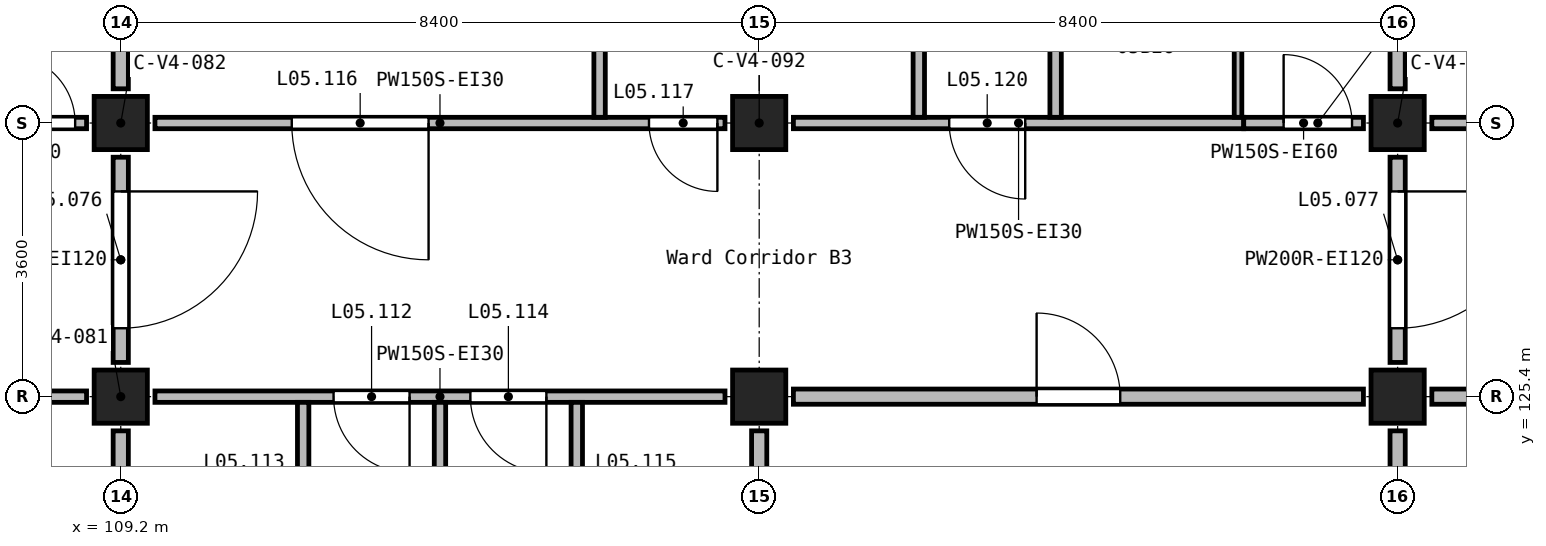
"""IFC4 building model, lengths in metres.
Left out: names, types, materials, properties, quantities, classifications, styles, units other than length and angle.
Written with IfcOpenShell. Run it as: python <this file> out.ifc"""

import sys

from ifc_helpers import new_model, si_unit, direction, frame, frame_2d, origin, origin_2d, place, context, subcontext, project, spatial, rectangle, extrude, element, fill, save


model = new_model("IFC4")
c1 = context("Model", 3, precision=1e-05, world=origin(), true_north=direction((0.0, 1.0)))
c2 = subcontext(c1, "Body", "Model", "MODEL_VIEW")
j1 = project(units=[si_unit("LENGTHUNIT", "METRE"), si_unit("PLANEANGLEUNIT", "RADIAN")], contexts=[c1])
p1 = place(None, origin())
s1 = spatial("IfcSite", under=j1, at=p1, CompositionType="ELEMENT")
p2 = place(p1, origin())
s2 = spatial("IfcBuilding", under=s1, at=p2, CompositionType="ELEMENT")
p3 = place(p2, frame((0.0, 0.0, 24.9)))
s3 = spatial("IfcBuildingStorey", under=s2, at=p3, CompositionType="ELEMENT", Elevation=24.9)
for number, where, z_axis, x_axis in (
    (1, (109.2, 125.4, 0.0), (0.0, 0.0, 1.0), (1.0, 0.0, 0.0)),
    (2, (109.2, 129.0, 0.0), (0.0, 0.0, 1.0), (1.0, 0.0, 0.0)),
    (3, (117.6, 125.4, 0.0), (0.0, 0.0, 1.0), (1.0, 0.0, 0.0)),
    (4, (117.6, 129.0, 0.0), (0.0, 0.0, 1.0), (1.0, 0.0, 0.0)),
    (5, (126.0, 125.4, 0.0), (0.0, 0.0, 1.0), (1.0, 0.0, 0.0)),
    (6, (126.0, 129.0, 0.0), (0.0, 0.0, 1.0), (1.0, 0.0, 0.0)),
):
    element("IfcColumn", number, at=place(p3, frame(where, z_axis=z_axis, x_axis=x_axis)), inside=s3, PredefinedType="COLUMN", context=c2, shape_type="SweptSolid", body=[
        extrude(rectangle(XDim=0.7, YDim=0.7, at=origin_2d()), origin(), (0.0, 0.0, 1.0), 3.9),
    ])
p4 = place(p3, frame((109.2, 136.35, 0.0), z_axis=(0.0, 0.0, 1.0), x_axis=(0.0, -1.0, 0.0)))
e7 = element("IfcWall", 7, at=p4, inside=s3, PredefinedType="SOLIDWALL", context=c2, shape_type="SweptSolid", body=[
    extrude(rectangle(XDim=6.9, YDim=0.2, at=frame_2d((3.45, 0.0))), origin(), (0.0, 0.0, 1.0), 3.6),
])
p5 = place(p3, frame((109.2, 128.55, 0.0), z_axis=(0.0, 0.0, 1.0), x_axis=(0.0, -1.0, 0.0)))
e8 = element("IfcWall", 8, at=p5, inside=s3, PredefinedType="SOLIDWALL", context=c2, shape_type="SweptSolid", body=[
    extrude(rectangle(XDim=2.7, YDim=0.2, at=frame_2d((1.35, 0.0))), origin(), (0.0, 0.0, 1.0), 3.6),
])
p6 = place(p5, frame((0.45, 0.0, 0.0)))
e9 = element("IfcOpeningElement", 9, at=p6, cuts=e8, PredefinedType="OPENING", context=c2, shape_type="SweptSolid", body=[
    extrude(rectangle(XDim=1.8, YDim=2.1, at=frame_2d((0.9, 1.05))), frame((0.0, 0.11, 0.0), z_axis=(0.0, -1.0, 0.0), x_axis=(1.0, 0.0, 0.0)), (0.0, 0.0, 1.0), 0.22),
])
p7 = place(p3, frame((109.2, 124.95, 0.0), z_axis=(0.0, 0.0, 1.0), x_axis=(0.0, -1.0, 0.0)))
e10 = element("IfcWall", 10, at=p7, inside=s3, PredefinedType="SOLIDWALL", context=c2, shape_type="SweptSolid", body=[
    extrude(rectangle(XDim=6.9, YDim=0.2, at=frame_2d((3.45, 0.0))), origin(), (0.0, 0.0, 1.0), 3.6),
])
p8 = place(p3, frame((126.0, 136.35, 0.0), z_axis=(0.0, 0.0, 1.0), x_axis=(0.0, -1.0, 0.0)))
e11 = element("IfcWall", 11, at=p8, inside=s3, PredefinedType="SOLIDWALL", context=c2, shape_type="SweptSolid", body=[
    extrude(rectangle(XDim=6.9, YDim=0.2, at=frame_2d((3.45, 0.0))), origin(), (0.0, 0.0, 1.0), 3.6),
])
p9 = place(p3, frame((126.0, 128.55, 0.0), z_axis=(0.0, 0.0, 1.0), x_axis=(0.0, -1.0, 0.0)))
e12 = element("IfcWall", 12, at=p9, inside=s3, PredefinedType="SOLIDWALL", context=c2, shape_type="SweptSolid", body=[
    extrude(rectangle(XDim=2.7, YDim=0.2, at=frame_2d((1.35, 0.0))), origin(), (0.0, 0.0, 1.0), 3.6),
])
p10 = place(p9, frame((0.45, 0.0, 0.0)))
e13 = element("IfcOpeningElement", 13, at=p10, cuts=e12, PredefinedType="OPENING", context=c2, shape_type="SweptSolid", body=[
    extrude(rectangle(XDim=1.8, YDim=2.1, at=frame_2d((0.9, 1.05))), frame((0.0, 0.11, 0.0), z_axis=(0.0, -1.0, 0.0), x_axis=(1.0, 0.0, 0.0)), (0.0, 0.0, 1.0), 0.22),
])
p11 = place(p3, frame((126.0, 124.95, 0.0), z_axis=(0.0, 0.0, 1.0), x_axis=(0.0, -1.0, 0.0)))
e14 = element("IfcWall", 14, at=p11, inside=s3, PredefinedType="SOLIDWALL", context=c2, shape_type="SweptSolid", body=[
    extrude(rectangle(XDim=1.775, YDim=0.2, at=frame_2d((0.887, 0.0))), origin(), (0.0, 0.0, 1.0), 3.6),
])
p12 = place(p3, frame((118.05, 125.4, 0.0), z_axis=(0.0, 0.0, 1.0), x_axis=(1.0, 0.0, 0.0)))
e15 = element("IfcWall", 15, at=p12, inside=s3, PredefinedType="SOLIDWALL", context=c2, shape_type="SweptSolid", body=[
    extrude(rectangle(XDim=7.5, YDim=0.2, at=frame_2d((3.75, 0.0))), origin(), (0.0, 0.0, 1.0), 3.6),
])
p13 = place(p12, frame((3.2, 0.0, 0.0)))
e16 = element("IfcOpeningElement", 16, at=p13, cuts=e15, PredefinedType="OPENING", context=c2, shape_type="SweptSolid", body=[
    extrude(rectangle(XDim=1.1, YDim=2.1, at=frame_2d((0.55, 1.05))), frame((0.0, 0.11, 0.0), z_axis=(0.0, -1.0, 0.0), x_axis=(1.0, 0.0, 0.0)), (0.0, 0.0, 1.0), 0.22),
])
p14 = place(p3, frame((126.45, 125.4, 0.0), z_axis=(0.0, 0.0, 1.0), x_axis=(1.0, 0.0, 0.0)))
e17 = element("IfcWall", 17, at=p14, inside=s3, PredefinedType="SOLIDWALL", context=c2, shape_type="SweptSolid", body=[
    extrude(rectangle(XDim=3.85, YDim=0.2, at=frame_2d((1.925, 0.0))), origin(), (0.0, 0.0, 1.0), 3.6),
])
p15 = place(p14, frame((1.15, 0.0, 0.0)))
e18 = element("IfcOpeningElement", 18, at=p15, cuts=e17, PredefinedType="OPENING", context=c2, shape_type="SweptSolid", body=[
    extrude(rectangle(XDim=1.0, YDim=2.1, at=frame_2d((0.5, 1.05))), frame((0.0, 0.11, 0.0), z_axis=(0.0, -1.0, 0.0), x_axis=(1.0, 0.0, 0.0)), (0.0, 0.0, 1.0), 0.22),
])
p16 = place(p3, frame((117.6, 123.175, 0.0), z_axis=(0.0, 0.0, 1.0), x_axis=(0.0, 1.0, 0.0)))
e19 = element("IfcWall", 19, at=p16, inside=s3, PredefinedType="SOLIDWALL", context=c2, shape_type="SweptSolid", body=[
    extrude(rectangle(XDim=1.775, YDim=0.2, at=frame_2d((0.887, 0.0))), origin(), (0.0, 0.0, 1.0), 3.6),
])
p17 = place(p3, frame((117.15, 125.4, 0.0), z_axis=(0.0, 0.0, 1.0), x_axis=(-1.0, 0.0, 0.0)))
e20 = element("IfcWall", 20, at=p17, inside=s3, PredefinedType="PARTITIONING", context=c2, shape_type="SweptSolid", body=[
    extrude(rectangle(XDim=7.5, YDim=0.15, at=frame_2d((3.75, 0.0))), origin(), (0.0, 0.0, 1.0), 3.6),
])
p18 = place(p17, frame((4.15, 0.0, 0.0)))
e21 = element("IfcOpeningElement", 21, at=p18, cuts=e20, PredefinedType="OPENING", context=c2, shape_type="SweptSolid", body=[
    extrude(rectangle(XDim=1.0, YDim=2.1, at=frame_2d((0.5, 1.05))), frame((0.0, 0.085, 0.0), z_axis=(0.0, -1.0, 0.0), x_axis=(1.0, 0.0, 0.0)), (0.0, 0.0, 1.0), 0.17),
])
p19 = place(p17, frame((2.35, 0.0, 0.0)))
e22 = element("IfcOpeningElement", 22, at=p19, cuts=e20, PredefinedType="OPENING", context=c2, shape_type="SweptSolid", body=[
    extrude(rectangle(XDim=1.0, YDim=2.1, at=frame_2d((0.5, 1.05))), frame((0.0, 0.085, 0.0), z_axis=(0.0, -1.0, 0.0), x_axis=(1.0, 0.0, 0.0)), (0.0, 0.0, 1.0), 0.17),
])
p20 = place(p3, frame((108.75, 125.4, 0.0), z_axis=(0.0, 0.0, 1.0), x_axis=(-1.0, 0.0, 0.0)))
e23 = element("IfcWall", 23, at=p20, inside=s3, PredefinedType="PARTITIONING", context=c2, shape_type="SweptSolid", body=[
    extrude(rectangle(XDim=7.5, YDim=0.15, at=frame_2d((3.75, 0.0))), origin(), (0.0, 0.0, 1.0), 3.6),
])
p21 = place(p20, frame((6.1, 0.0, 0.0)))
e24 = element("IfcOpeningElement", 24, at=p21, cuts=e23, PredefinedType="OPENING", context=c2, shape_type="SweptSolid", body=[
    extrude(rectangle(XDim=1.0, YDim=2.1, at=frame_2d((0.5, 1.05))), frame((0.0, 0.085, 0.0), z_axis=(0.0, -1.0, 0.0), x_axis=(1.0, 0.0, 0.0)), (0.0, 0.0, 1.0), 0.17),
])
p22 = place(p20, frame((2.35, 0.0, 0.0)))
e25 = element("IfcOpeningElement", 25, at=p22, cuts=e23, PredefinedType="OPENING", context=c2, shape_type="SweptSolid", body=[
    extrude(rectangle(XDim=1.0, YDim=2.1, at=frame_2d((0.5, 1.05))), frame((0.0, 0.085, 0.0), z_axis=(0.0, -1.0, 0.0), x_axis=(1.0, 0.0, 0.0)), (0.0, 0.0, 1.0), 0.17),
])
p23 = place(p3, frame((123.975, 129.0, 0.0), z_axis=(0.0, 0.0, 1.0), x_axis=(-1.0, 0.0, 0.0)))
e26 = element("IfcWall", 26, at=p23, inside=s3, PredefinedType="PARTITIONING", context=c2, shape_type="SweptSolid", body=[
    extrude(rectangle(XDim=5.925, YDim=0.15, at=frame_2d((2.962, 0.0))), origin(), (0.0, 0.0, 1.0), 3.6),
])
p24 = place(p23, frame((2.875, 0.0, 0.0)))
e27 = element("IfcOpeningElement", 27, at=p24, cuts=e26, PredefinedType="OPENING", context=c2, shape_type="SweptSolid", body=[
    extrude(rectangle(XDim=1.0, YDim=2.1, at=frame_2d((0.5, 1.05))), frame((0.0, 0.085, 0.0), z_axis=(0.0, -1.0, 0.0), x_axis=(1.0, 0.0, 0.0)), (0.0, 0.0, 1.0), 0.17),
])
p25 = place(p3, frame((117.15, 129.0, 0.0), z_axis=(0.0, 0.0, 1.0), x_axis=(-1.0, 0.0, 0.0)))
e28 = element("IfcWall", 28, at=p25, inside=s3, PredefinedType="PARTITIONING", context=c2, shape_type="SweptSolid", body=[
    extrude(rectangle(XDim=7.5, YDim=0.15, at=frame_2d((3.75, 0.0))), origin(), (0.0, 0.0, 1.0), 3.6),
])
p26 = place(p25, frame((3.9, 0.0, 0.0)))
e29 = element("IfcOpeningElement", 29, at=p26, cuts=e28, PredefinedType="OPENING", context=c2, shape_type="SweptSolid", body=[
    extrude(rectangle(XDim=1.8, YDim=2.1, at=frame_2d((0.9, 1.05))), frame((0.0, 0.085, 0.0), z_axis=(0.0, -1.0, 0.0), x_axis=(1.0, 0.0, 0.0)), (0.0, 0.0, 1.0), 0.17),
])
p27 = place(p25, frame((0.1, 0.0, 0.0)))
e30 = element("IfcOpeningElement", 30, at=p27, cuts=e28, PredefinedType="OPENING", context=c2, shape_type="SweptSolid", body=[
    extrude(rectangle(XDim=0.9, YDim=2.1, at=frame_2d((0.45, 1.05))), frame((0.0, 0.085, 0.0), z_axis=(0.0, -1.0, 0.0), x_axis=(1.0, 0.0, 0.0)), (0.0, 0.0, 1.0), 0.17),
])
p28 = place(p3, frame((126.45, 129.0, 0.0), z_axis=(0.0, 0.0, 1.0), x_axis=(1.0, 0.0, 0.0)))
e31 = element("IfcWall", 31, at=p28, inside=s3, PredefinedType="PARTITIONING", context=c2, shape_type="SweptSolid", body=[
    extrude(rectangle(XDim=7.5, YDim=0.15, at=frame_2d((3.75, 0.0))), origin(), (0.0, 0.0, 1.0), 3.6),
])
p29 = place(p28, frame((4.6, 0.0, 0.0)))
e32 = element("IfcOpeningElement", 32, at=p29, cuts=e31, PredefinedType="OPENING", context=c2, shape_type="SweptSolid", body=[
    extrude(rectangle(XDim=1.0, YDim=2.1, at=frame_2d((0.5, 1.05))), frame((0.0, 0.085, 0.0), z_axis=(0.0, -1.0, 0.0), x_axis=(1.0, 0.0, 0.0)), (0.0, 0.0, 1.0), 0.17),
])
p30 = place(p3, frame((107.175, 129.0, 0.0), z_axis=(0.0, 0.0, 1.0), x_axis=(1.0, 0.0, 0.0)))
e33 = element("IfcWall", 33, at=p30, inside=s3, PredefinedType="PARTITIONING", context=c2, shape_type="SweptSolid", body=[
    extrude(rectangle(XDim=1.575, YDim=0.15, at=frame_2d((0.788, 0.0))), origin(), (0.0, 0.0, 1.0), 3.6),
])
p31 = place(p30, frame((0.525, 0.0, 0.0)))
e34 = element("IfcOpeningElement", 34, at=p31, cuts=e33, PredefinedType="OPENING", context=c2, shape_type="SweptSolid", body=[
    extrude(rectangle(XDim=0.9, YDim=2.1, at=frame_2d((0.45, 1.05))), frame((0.0, 0.085, 0.0), z_axis=(0.0, -1.0, 0.0), x_axis=(1.0, 0.0, 0.0)), (0.0, 0.0, 1.0), 0.17),
])
p32 = place(p3, frame((123.975, 129.0, 0.0), z_axis=(0.0, 0.0, 1.0), x_axis=(1.0, 0.0, 0.0)))
e35 = element("IfcWall", 35, at=p32, inside=s3, PredefinedType="PARTITIONING", context=c2, shape_type="SweptSolid", body=[
    extrude(rectangle(XDim=1.575, YDim=0.15, at=frame_2d((0.788, 0.0))), origin(), (0.0, 0.0, 1.0), 3.6),
])
p33 = place(p32, frame((0.525, 0.0, 0.0)))
e36 = element("IfcOpeningElement", 36, at=p33, cuts=e35, PredefinedType="OPENING", context=c2, shape_type="SweptSolid", body=[
    extrude(rectangle(XDim=0.9, YDim=2.1, at=frame_2d((0.45, 1.05))), frame((0.0, 0.085, 0.0), z_axis=(0.0, -1.0, 0.0), x_axis=(1.0, 0.0, 0.0)), (0.0, 0.0, 1.0), 0.17),
])
p34 = place(p3, frame((113.4, 118.05, 0.0), z_axis=(0.0, 0.0, 1.0), x_axis=(0.0, 1.0, 0.0)))
e37 = element("IfcWall", 37, at=p34, inside=s3, PredefinedType="PARTITIONING", context=c2, shape_type="SweptSolid", body=[
    extrude(rectangle(XDim=7.275, YDim=0.15, at=frame_2d((3.637, 0.0))), origin(), (0.0, 0.0, 1.0), 3.6),
])
p35 = place(p3, frame((119.7, 129.075, 0.0), z_axis=(0.0, 0.0, 1.0), x_axis=(0.0, 1.0, 0.0)))
e38 = element("IfcWall", 38, at=p35, inside=s3, PredefinedType="PARTITIONING", context=c2, shape_type="SweptSolid", body=[
    extrude(rectangle(XDim=7.275, YDim=0.15, at=frame_2d((3.638, 0.0))), origin(), (0.0, 0.0, 1.0), 3.6),
])
p36 = place(p3, frame((111.6, 122.175, 0.0), z_axis=(0.0, 0.0, 1.0), x_axis=(0.0, 1.0, 0.0)))
e39 = element("IfcWall", 39, at=p36, inside=s3, PredefinedType="PARTITIONING", context=c2, shape_type="SweptSolid", body=[
    extrude(rectangle(XDim=3.15, YDim=0.15, at=frame_2d((1.575, 0.0))), origin(), (0.0, 0.0, 1.0), 3.6),
])
p37 = place(p36, frame((1.125, 0.0, 0.0)))
e40 = element("IfcOpeningElement", 40, at=p37, cuts=e39, PredefinedType="OPENING", context=c2, shape_type="SweptSolid", body=[
    extrude(rectangle(XDim=0.9, YDim=2.1, at=frame_2d((0.45, 1.05))), frame((0.0, 0.085, 0.0), z_axis=(0.0, -1.0, 0.0), x_axis=(1.0, 0.0, 0.0)), (0.0, 0.0, 1.0), 0.17),
])
p38 = place(p3, frame((115.2, 122.025, 0.0), z_axis=(0.0, 0.0, 1.0), x_axis=(0.0, 1.0, 0.0)))
e41 = element("IfcWall", 41, at=p38, inside=s3, PredefinedType="PARTITIONING", context=c2, shape_type="SweptSolid", body=[
    extrude(rectangle(XDim=3.3, YDim=0.15, at=frame_2d((1.65, 0.0))), origin(), (0.0, 0.0, 1.0), 3.6),
])
p39 = place(p38, frame((1.275, 0.0, 0.0)))
e42 = element("IfcOpeningElement", 42, at=p39, cuts=e41, PredefinedType="OPENING", context=c2, shape_type="SweptSolid", body=[
    extrude(rectangle(XDim=0.9, YDim=2.1, at=frame_2d((0.45, 1.05))), frame((0.0, 0.085, 0.0), z_axis=(0.0, -1.0, 0.0), x_axis=(1.0, 0.0, 0.0)), (0.0, 0.0, 1.0), 0.17),
])
p40 = place(p3, frame((121.5, 129.075, 0.0), z_axis=(0.0, 0.0, 1.0), x_axis=(0.0, 1.0, 0.0)))
e43 = element("IfcWall", 43, at=p40, inside=s3, PredefinedType="PARTITIONING", context=c2, shape_type="SweptSolid", body=[
    extrude(rectangle(XDim=3.3, YDim=0.15, at=frame_2d((1.65, 0.0))), origin(), (0.0, 0.0, 1.0), 3.6),
])
p41 = place(p40, frame((1.125, 0.0, 0.0)))
e44 = element("IfcOpeningElement", 44, at=p41, cuts=e43, PredefinedType="OPENING", context=c2, shape_type="SweptSolid", body=[
    extrude(rectangle(XDim=0.9, YDim=2.1, at=frame_2d((0.45, 1.05))), frame((0.0, 0.085, 0.0), z_axis=(0.0, -1.0, 0.0), x_axis=(1.0, 0.0, 0.0)), (0.0, 0.0, 1.0), 0.17),
])
p42 = place(p3, frame((115.5, 129.075, 0.0), z_axis=(0.0, 0.0, 1.0), x_axis=(0.0, 1.0, 0.0)))
e45 = element("IfcWall", 45, at=p42, inside=s3, PredefinedType="PARTITIONING", context=c2, shape_type="SweptSolid", body=[
    extrude(rectangle(XDim=1.95, YDim=0.15, at=frame_2d((0.975, 0.0))), origin(), (0.0, 0.0, 1.0), 3.6),
])
p43 = place(p3, frame((123.9, 129.075, 0.0), z_axis=(0.0, 0.0, 1.0), x_axis=(0.0, 1.0, 0.0)))
e46 = element("IfcWall", 46, at=p43, inside=s3, PredefinedType="PARTITIONING", context=c2, shape_type="SweptSolid", body=[
    extrude(rectangle(XDim=3.15, YDim=0.1, at=frame_2d((1.575, 0.0))), origin(), (0.0, 0.0, 1.0), 3.6),
])
p44 = place(p6, origin())
e47 = element("IfcDoor", 47, at=p44, inside=s3, OperationType="DOUBLE_DOOR_SINGLE_SWING", PredefinedType="DOOR", context=c2, shape_type="SweptSolid", body=[
    extrude(rectangle(XDim=1.8, YDim=2.1, at=frame_2d((0.9, 1.05))), frame((0.0, 0.025, 0.0), z_axis=(0.0, -1.0, 0.0), x_axis=(1.0, 0.0, 0.0)), (0.0, 0.0, 1.0), 0.05),
])
fill(e9, e47)
p45 = place(p10, origin())
e48 = element("IfcDoor", 48, at=p45, inside=s3, OperationType="DOUBLE_DOOR_SINGLE_SWING", PredefinedType="DOOR", context=c2, shape_type="SweptSolid", body=[
    extrude(rectangle(XDim=1.8, YDim=2.1, at=frame_2d((0.9, 1.05))), frame((0.0, 0.025, 0.0), z_axis=(0.0, -1.0, 0.0), x_axis=(1.0, 0.0, 0.0)), (0.0, 0.0, 1.0), 0.05),
])
fill(e13, e48)
p46 = place(p31, origin())
e49 = element("IfcDoor", 49, at=p46, inside=s3, OperationType="SINGLE_SWING_RIGHT", PredefinedType="DOOR", context=c2, shape_type="SweptSolid", body=[
    extrude(rectangle(XDim=0.9, YDim=2.1, at=frame_2d((0.45, 1.05))), frame((0.0, 0.025, 0.0), z_axis=(0.0, -1.0, 0.0), x_axis=(1.0, 0.0, 0.0)), (0.0, 0.0, 1.0), 0.05),
])
fill(e34, e49)
p47 = place(p18, origin())
e50 = element("IfcDoor", 50, at=p47, inside=s3, OperationType="SINGLE_SWING_RIGHT", PredefinedType="DOOR", context=c2, shape_type="SweptSolid", body=[
    extrude(rectangle(XDim=1.0, YDim=2.1, at=frame_2d((0.5, 1.05))), frame((0.0, 0.025, 0.0), z_axis=(0.0, -1.0, 0.0), x_axis=(1.0, 0.0, 0.0)), (0.0, 0.0, 1.0), 0.05),
])
fill(e21, e50)
p48 = place(p19, origin())
e51 = element("IfcDoor", 51, at=p48, inside=s3, OperationType="SINGLE_SWING_LEFT", PredefinedType="DOOR", context=c2, shape_type="SweptSolid", body=[
    extrude(rectangle(XDim=1.0, YDim=2.1, at=frame_2d((0.5, 1.05))), frame((0.0, 0.025, 0.0), z_axis=(0.0, -1.0, 0.0), x_axis=(1.0, 0.0, 0.0)), (0.0, 0.0, 1.0), 0.05),
])
fill(e22, e51)
p49 = place(p26, frame((1.8, 0.0, 0.0), z_axis=(0.0, 0.0, 1.0), x_axis=(-1.0, 0.0, 0.0)))
e52 = element("IfcDoor", 52, at=p49, inside=s3, OperationType="DOUBLE_DOOR_SINGLE_SWING", PredefinedType="DOOR", context=c2, shape_type="SweptSolid", body=[
    extrude(rectangle(XDim=1.8, YDim=2.1, at=frame_2d((0.9, 1.05))), frame((0.0, 0.025, 0.0), z_axis=(0.0, -1.0, 0.0), x_axis=(1.0, 0.0, 0.0)), (0.0, 0.0, 1.0), 0.05),
])
fill(e29, e52)
p50 = place(p27, frame((0.9, 0.0, 0.0), z_axis=(0.0, 0.0, 1.0), x_axis=(-1.0, 0.0, 0.0)))
e53 = element("IfcDoor", 53, at=p50, inside=s3, OperationType="SINGLE_SWING_RIGHT", PredefinedType="DOOR", context=c2, shape_type="SweptSolid", body=[
    extrude(rectangle(XDim=0.9, YDim=2.1, at=frame_2d((0.45, 1.05))), frame((0.0, 0.025, 0.0), z_axis=(0.0, -1.0, 0.0), x_axis=(1.0, 0.0, 0.0)), (0.0, 0.0, 1.0), 0.05),
])
fill(e30, e53)
p51 = place(p24, frame((1.0, 0.0, 0.0), z_axis=(0.0, 0.0, 1.0), x_axis=(-1.0, 0.0, 0.0)))
e54 = element("IfcDoor", 54, at=p51, inside=s3, OperationType="SINGLE_SWING_LEFT", PredefinedType="DOOR", context=c2, shape_type="SweptSolid", body=[
    extrude(rectangle(XDim=1.0, YDim=2.1, at=frame_2d((0.5, 1.05))), frame((0.0, 0.025, 0.0), z_axis=(0.0, -1.0, 0.0), x_axis=(1.0, 0.0, 0.0)), (0.0, 0.0, 1.0), 0.05),
])
fill(e27, e54)
p52 = place(p33, origin())
e55 = element("IfcDoor", 55, at=p52, inside=s3, OperationType="SINGLE_SWING_RIGHT", PredefinedType="DOOR", context=c2, shape_type="SweptSolid", body=[
    extrude(rectangle(XDim=0.9, YDim=2.1, at=frame_2d((0.45, 1.05))), frame((0.0, 0.025, 0.0), z_axis=(0.0, -1.0, 0.0), x_axis=(1.0, 0.0, 0.0)), (0.0, 0.0, 1.0), 0.05),
])
fill(e36, e55)
p53 = place(p13, frame((1.1, 0.0, 0.0), z_axis=(0.0, 0.0, 1.0), x_axis=(-1.0, 0.0, 0.0)))
e56 = element("IfcDoor", 56, at=p53, inside=s3, OperationType="SINGLE_SWING_LEFT", PredefinedType="DOOR", context=c2, shape_type="SweptSolid", body=[
    extrude(rectangle(XDim=1.1, YDim=2.1, at=frame_2d((0.55, 1.05))), frame((0.0, 0.025, 0.0), z_axis=(0.0, -1.0, 0.0), x_axis=(1.0, 0.0, 0.0)), (0.0, 0.0, 1.0), 0.05),
])
fill(e16, e56)
save(model, sys.argv[1])
